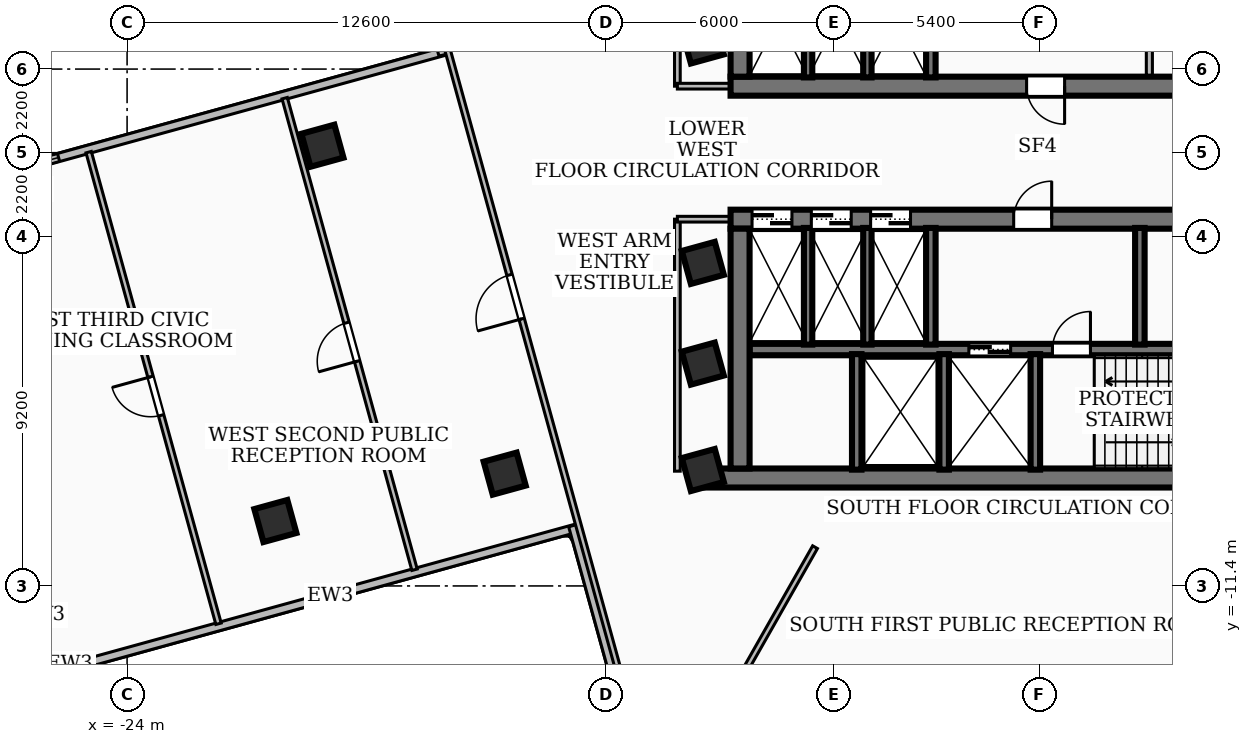
"""IFC4 building model, lengths in metres.
Left out: names, types, materials, properties, quantities, classifications, styles, units other than length and angle.
Written with IfcOpenShell. Run it as: python <this file> out.ifc"""

import sys

from ifc_helpers import new_model, si_unit, direction, frame, frame_2d, origin, origin_2d, place, context, subcontext, project, spatial, rectangle, extrude, element, fill, save


model = new_model("IFC4")
c1 = context("Model", 3, precision=1e-05, world=origin(), true_north=direction((0.0, 1.0)))
c2 = subcontext(c1, "Body", "Model", "MODEL_VIEW")
j1 = project(units=[si_unit("LENGTHUNIT", "METRE"), si_unit("PLANEANGLEUNIT", "RADIAN")], contexts=[c1])
p1 = place(None, origin())
s1 = spatial("IfcSite", under=j1, at=p1, CompositionType="ELEMENT")
p2 = place(p1, origin())
s2 = spatial("IfcBuilding", under=s1, at=p2, CompositionType="ELEMENT")
p3 = place(p2, frame((0.0, 0.0, 137.88)))
s3 = spatial("IfcBuildingStorey", under=s2, at=p3, CompositionType="ELEMENT", Elevation=137.88)
p4 = place(p3, frame((8.12, 1.75, 0.0), z_axis=(0.0, 0.0, 1.0), x_axis=(-1.0, 0.0, 0.0)))
e1 = element("IfcWall", 1, at=p4, inside=s3, PredefinedType="SHEAR", context=c2, shape_type="SweptSolid", body=[
    extrude(rectangle(XDim=16.24, YDim=0.5, at=frame_2d((8.12, 0.0))), origin(), (0.0, 0.0, 1.0), 3.32),
])
p5 = place(p4, frame((7.45, 0.0, 0.0)))
e2 = element("IfcOpeningElement", 2, at=p5, cuts=e1, PredefinedType="OPENING", context=c2, shape_type="SweptSolid", body=[
    extrude(rectangle(XDim=1.0, YDim=2.1, at=frame_2d((0.5, 1.05))), frame((0.0, 0.26, 0.0), z_axis=(0.0, -1.0, 0.0), x_axis=(1.0, 0.0, 0.0)), (0.0, 0.0, 1.0), 0.52),
])
p6 = place(p4, frame((3.4, 0.0, 0.0)))
e3 = element("IfcOpeningElement", 3, at=p6, cuts=e1, PredefinedType="OPENING", context=c2, shape_type="SweptSolid", body=[
    extrude(rectangle(XDim=0.9, YDim=2.06, at=frame_2d((0.45, 1.03))), frame((0.0, 0.26, 0.0), z_axis=(0.0, -1.0, 0.0), x_axis=(1.0, 0.0, 0.0)), (0.0, 0.0, 1.0), 0.52),
])
p7 = place(p4, frame((1.1, 0.0, 0.0)))
e4 = element("IfcOpeningElement", 4, at=p7, cuts=e1, PredefinedType="OPENING", context=c2, shape_type="SweptSolid", body=[
    extrude(rectangle(XDim=0.9, YDim=2.06, at=frame_2d((0.45, 1.03))), frame((0.0, 0.26, 0.0), z_axis=(0.0, -1.0, 0.0), x_axis=(1.0, 0.0, 0.0)), (0.0, 0.0, 1.0), 0.52),
])
p8 = place(p3, frame((-7.87, 2.0, 0.0), z_axis=(0.0, 0.0, 1.0), x_axis=(0.0, 1.0, 0.0)))
e5 = element("IfcWall", 5, at=p8, inside=s3, PredefinedType="SHEAR", context=c2, shape_type="SweptSolid", body=[
    extrude(rectangle(XDim=6.31, YDim=0.5, at=frame_2d((3.155, 0.0))), origin(), (0.0, 0.0, 1.0), 3.32),
])
p9 = place(p3, frame((8.78, -8.56, 0.0), z_axis=(0.0, 0.0, 1.0), x_axis=(-1.0, 0.0, 0.0)))
e6 = element("IfcWall", 6, at=p9, inside=s3, PredefinedType="SHEAR", context=c2, shape_type="SweptSolid", body=[
    extrude(rectangle(XDim=17.56, YDim=0.5, at=frame_2d((8.78, 0.0))), origin(), (0.0, 0.0, 1.0), 3.32),
])
p10 = place(p3, frame((-8.12, -1.75, 0.0), z_axis=(0.0, 0.0, 1.0), x_axis=(1.0, 0.0, 0.0)))
e7 = element("IfcWall", 7, at=p10, inside=s3, PredefinedType="SHEAR", context=c2, shape_type="SweptSolid", body=[
    extrude(rectangle(XDim=16.24, YDim=0.5, at=frame_2d((8.12, 0.0))), origin(), (0.0, 0.0, 1.0), 3.32),
])
p11 = place(p10, frame((7.45, 0.0, 0.0)))
e8 = element("IfcOpeningElement", 8, at=p11, cuts=e7, PredefinedType="OPENING", context=c2, shape_type="SweptSolid", body=[
    extrude(rectangle(XDim=1.0, YDim=2.1, at=frame_2d((0.5, 1.05))), frame((0.0, 0.26, 0.0), z_axis=(0.0, -1.0, 0.0), x_axis=(1.0, 0.0, 0.0)), (0.0, 0.0, 1.0), 0.52),
])
p12 = place(p10, frame((12.65, 0.0, 0.0)))
e9 = element("IfcOpeningElement", 9, at=p12, cuts=e7, PredefinedType="OPENING", context=c2, shape_type="SweptSolid", body=[
    extrude(rectangle(XDim=0.9, YDim=2.06, at=frame_2d((0.45, 1.03))), frame((0.0, 0.26, 0.0), z_axis=(0.0, -1.0, 0.0), x_axis=(1.0, 0.0, 0.0)), (0.0, 0.0, 1.0), 0.52),
])
p13 = place(p10, frame((0.565, 0.0, 0.0)))
e10 = element("IfcOpeningElement", 10, at=p13, cuts=e7, PredefinedType="OPENING", context=c2, shape_type="SweptSolid", body=[
    extrude(rectangle(XDim=1.05, YDim=2.15, at=frame_2d((0.525, 1.075))), frame((0.0, 0.26, 0.0), z_axis=(0.0, -1.0, 0.0), x_axis=(1.0, 0.0, 0.0)), (0.0, 0.0, 1.0), 0.52),
])
p14 = place(p10, frame((2.125, 0.0, 0.0)))
e11 = element("IfcOpeningElement", 11, at=p14, cuts=e7, PredefinedType="OPENING", context=c2, shape_type="SweptSolid", body=[
    extrude(rectangle(XDim=1.05, YDim=2.15, at=frame_2d((0.525, 1.075))), frame((0.0, 0.26, 0.0), z_axis=(0.0, -1.0, 0.0), x_axis=(1.0, 0.0, 0.0)), (0.0, 0.0, 1.0), 0.52),
])
p15 = place(p10, frame((3.685, 0.0, 0.0)))
e12 = element("IfcOpeningElement", 12, at=p15, cuts=e7, PredefinedType="OPENING", context=c2, shape_type="SweptSolid", body=[
    extrude(rectangle(XDim=1.05, YDim=2.15, at=frame_2d((0.525, 1.075))), frame((0.0, 0.26, 0.0), z_axis=(0.0, -1.0, 0.0), x_axis=(1.0, 0.0, 0.0)), (0.0, 0.0, 1.0), 0.52),
])
p16 = place(p3, frame((-7.87, -8.31, 0.0), z_axis=(0.0, 0.0, 1.0), x_axis=(0.0, 1.0, 0.0)))
e13 = element("IfcWall", 13, at=p16, inside=s3, PredefinedType="SHEAR", context=c2, shape_type="SweptSolid", body=[
    extrude(rectangle(XDim=6.31, YDim=0.5, at=frame_2d((3.155, 0.0))), origin(), (0.0, 0.0, 1.0), 3.32),
])
p17 = place(p3, frame((-7.62, -5.18, 0.0), z_axis=(0.0, 0.0, 1.0), x_axis=(1.0, 0.0, 0.0)))
e14 = element("IfcWall", 14, at=p17, inside=s3, PredefinedType="SOLIDWALL", context=c2, shape_type="SweptSolid", body=[
    extrude(rectangle(XDim=15.24, YDim=0.3, at=frame_2d((7.62, 0.0))), origin(), (0.0, 0.0, 1.0), 3.32),
])
p18 = place(p17, frame((5.77, 0.0, 0.0)))
e15 = element("IfcOpeningElement", 15, at=p18, cuts=e14, PredefinedType="OPENING", context=c2, shape_type="SweptSolid", body=[
    extrude(rectangle(XDim=1.1, YDim=2.15, at=frame_2d((0.55, 1.075))), frame((0.0, 0.16, 0.0), z_axis=(0.0, -1.0, 0.0), x_axis=(1.0, 0.0, 0.0)), (0.0, 0.0, 1.0), 0.32),
])
p19 = place(p17, frame((7.97, 0.0, 0.0)))
e16 = element("IfcOpeningElement", 16, at=p19, cuts=e14, PredefinedType="OPENING", context=c2, shape_type="SweptSolid", body=[
    extrude(rectangle(XDim=1.0, YDim=2.1, at=frame_2d((0.5, 1.05))), frame((0.0, 0.16, 0.0), z_axis=(0.0, -1.0, 0.0), x_axis=(1.0, 0.0, 0.0)), (0.0, 0.0, 1.0), 0.32),
])
p20 = place(p3, frame((-2.85, 1.98, 0.0), z_axis=(0.0, 0.0, 1.0), x_axis=(0.0, 1.0, 0.0)))
e17 = element("IfcWall", 17, at=p20, inside=s3, PredefinedType="SOLIDWALL", context=c2, shape_type="SweptSolid", body=[
    extrude(rectangle(XDim=3.07, YDim=0.25, at=frame_2d((1.535, 0.0))), origin(), (0.0, 0.0, 1.0), 3.32),
])
for number, where, z_axis, x_axis in (
    (18, (-0.1, -8.34, 0.0), (0.0, 0.0, 1.0), (0.0, 1.0, 0.0)),
    (19, (-2.5, -8.34, 0.0), (0.0, 0.0, 1.0), (0.0, 1.0, 0.0)),
    (20, (-4.8, -8.34, 0.0), (0.0, 0.0, 1.0), (0.0, 1.0, 0.0)),
):
    element("IfcWall", number, at=place(p3, frame(where, z_axis=z_axis, x_axis=x_axis)), inside=s3, PredefinedType="SOLIDWALL", context=c2, shape_type="SweptSolid", body=[
        extrude(rectangle(XDim=3.04, YDim=0.25, at=frame_2d((1.52, 0.0))), origin(), (0.0, 0.0, 1.0), 3.32),
    ])
for number, where, z_axis, x_axis in (
    (21, (-2.85, -5.05, 0.0), (0.0, 0.0, 1.0), (0.0, 1.0, 0.0)),
    (22, (2.65, -5.05, 0.0), (0.0, 0.0, 1.0), (0.0, 1.0, 0.0)),
):
    element("IfcWall", number, at=place(p3, frame(where, z_axis=z_axis, x_axis=x_axis)), inside=s3, PredefinedType="SOLIDWALL", context=c2, shape_type="SweptSolid", body=[
        extrude(rectangle(XDim=3.07, YDim=0.25, at=frame_2d((1.535, 0.0))), origin(), (0.0, 0.0, 1.0), 3.32),
    ])
for number, where, z_axis, x_axis in (
    (23, (-6.08, 1.98, 0.0), (0.0, 0.0, 1.0), (0.0, 1.0, 0.0)),
    (24, (-4.52, 1.98, 0.0), (0.0, 0.0, 1.0), (0.0, 1.0, 0.0)),
    (25, (-6.08, -5.05, 0.0), (0.0, 0.0, 1.0), (0.0, 1.0, 0.0)),
    (26, (-4.52, -5.05, 0.0), (0.0, 0.0, 1.0), (0.0, 1.0, 0.0)),
):
    element("IfcWall", number, at=place(p3, frame(where, z_axis=z_axis, x_axis=x_axis)), inside=s3, PredefinedType="SOLIDWALL", context=c2, shape_type="SweptSolid", body=[
        extrude(rectangle(XDim=3.07, YDim=0.22, at=frame_2d((1.535, 0.0))), origin(), (0.0, 0.0, 1.0), 3.32),
    ])
for number, where, z_axis, x_axis in (
    (27, (-8.85, -5.55, 0.0), (0.0, 0.0, 1.0), (0.964, 0.266, 0.0)),
    (28, (-8.85, -2.9, 0.0), (0.0, 0.0, 1.0), (0.964, 0.266, 0.0)),
    (29, (-8.85, 2.9, 0.0), (0.0, 0.0, 1.0), (0.964, 0.266, 0.0)),
    (30, (-8.85, -8.35, 0.0), (0.0, 0.0, 1.0), (0.964, 0.266, 0.0)),
    (31, (-18.86, 0.183, 0.0), (0.0, 0.0, 1.0), (0.964, 0.266, 0.0)),
    (32, (-14.064, -8.445, 0.0), (0.0, 0.0, 1.0), (0.964, 0.266, 0.0)),
    (33, (-20.098, -9.692, 0.0), (0.0, 0.0, 1.0), (0.964, 0.266, 0.0)),
):
    element("IfcColumn", number, at=place(p3, frame(where, z_axis=z_axis, x_axis=x_axis)), inside=s3, PredefinedType="COLUMN", context=c2, shape_type="SweptSolid", body=[
        extrude(rectangle(XDim=0.9, YDim=0.9, at=origin_2d()), origin(), (0.0, 0.0, 1.0), 3.6),
    ])
p21 = place(p3, frame((-12.166, -9.876, 0.0), z_axis=(0.0, 0.0, 1.0), x_axis=(-0.964099811745, -0.2655401156, 0.0)))
e34 = element("IfcWall", 34, at=p21, inside=s3, PredefinedType="SOLIDWALL", context=c2, shape_type="SweptSolid", body=[
    extrude(rectangle(XDim=13.459, YDim=0.22, at=frame_2d((6.729, 0.0))), origin(), (0.0, 0.0, 1.0), 2.624),
])
p22 = place(p3, frame((-25.093, -13.443, 0.0), z_axis=(0.0, 0.0, 1.0), x_axis=(-0.999982861094, -0.005854700592, 0.0)))
e35 = element("IfcWall", 35, at=p22, inside=s3, PredefinedType="SOLIDWALL", context=c2, shape_type="SweptSolid", body=[
    extrude(rectangle(XDim=0.834, YDim=0.22, at=frame_2d((0.417, 0.0))), origin(), (0.0, 0.0, 1.0), 3.32),
])
p23 = place(p3, frame((-25.88, -13.46, 0.0), z_axis=(0.0, 0.0, 1.0), x_axis=(-0.87005199541, 0.492959963164, 0.0)))
e36 = element("IfcWall", 36, at=p23, inside=s3, PredefinedType="SOLIDWALL", context=c2, shape_type="SweptSolid", body=[
    extrude(rectangle(XDim=0.82, YDim=0.22, at=frame_2d((0.41, 0.0))), origin(), (0.0, 0.0, 1.0), 3.32),
])
p24 = place(p3, frame((-28.599, -0.897, 0.0), z_axis=(0.0, 0.0, 1.0), x_axis=(0.964113270695, 0.265491245185, 0.0)))
e37 = element("IfcWall", 37, at=p24, inside=s3, PredefinedType="SOLIDWALL", context=c2, shape_type="SweptSolid", body=[
    extrude(rectangle(XDim=13.458, YDim=0.22, at=frame_2d((6.729, 0.0))), origin(), (0.0, 0.0, 1.0), 3.32),
])
p25 = place(p24, frame((1.1, 0.0, 0.85)))
e38 = element("IfcOpeningElement", 38, at=p25, cuts=e37, PredefinedType="OPENING", context=c2, shape_type="SweptSolid", body=[
    extrude(rectangle(XDim=1.8, YDim=2.0, at=frame_2d((0.9, 1.0))), frame((0.0, 0.12, 0.0), z_axis=(0.0, -1.0, 0.0), x_axis=(1.0, 0.0, 0.0)), (0.0, 0.0, 1.0), 0.24),
])
p26 = place(p3, frame((-15.686, 2.568, 0.0), z_axis=(0.0, 0.0, 1.0), x_axis=(-0.265558779784, 0.964094670911, 0.0)))
e39 = element("IfcWall", 39, at=p26, inside=s3, PredefinedType="SOLIDWALL", context=c2, shape_type="SweptSolid", body=[
    extrude(rectangle(XDim=6.319, YDim=0.22, at=frame_2d((3.159, 0.0))), origin(), (0.0, 0.0, 1.0), 3.32),
])
p27 = place(p3, frame((-10.479, -16.33, 0.0), z_axis=(0.0, 0.0, 1.0), x_axis=(-0.265567840793, 0.964092175021, 0.0)))
e40 = element("IfcWall", 40, at=p27, inside=s3, PredefinedType="SOLIDWALL", context=c2, shape_type="SweptSolid", body=[
    extrude(rectangle(XDim=6.759, YDim=0.22, at=frame_2d((3.379, 0.0))), origin(), (0.0, 0.0, 1.0), 2.624),
])
p28 = place(p3, frame((2.9, 2.04, 0.0), z_axis=(0.0, 0.0, 1.0), x_axis=(0.0, 1.0, 0.0)))
e41 = element("IfcWall", 41, at=p28, inside=s3, PredefinedType="PARTITIONING", context=c2, shape_type="SweptSolid", body=[
    extrude(rectangle(XDim=2.94, YDim=0.16, at=frame_2d((1.47, 0.0))), origin(), (0.0, 0.0, 1.0), 2.55),
])
p29 = place(p28, frame((1.82, 0.0, 0.0)))
e42 = element("IfcOpeningElement", 42, at=p29, cuts=e41, PredefinedType="OPENING", context=c2, shape_type="SweptSolid", body=[
    extrude(rectangle(XDim=0.9, YDim=2.06, at=frame_2d((0.45, 1.03))), frame((0.0, 0.09, 0.0), z_axis=(0.0, -1.0, 0.0), x_axis=(1.0, 0.0, 0.0)), (0.0, 0.0, 1.0), 0.18),
])
p30 = place(p3, frame((-9.52, 1.75, 0.0), z_axis=(0.0, 0.0, 1.0), x_axis=(0.0, 1.0, 0.0)))
e43 = element("IfcWall", 43, at=p30, inside=s3, PredefinedType="PARTITIONING", context=c2, shape_type="SweptSolid", body=[
    extrude(rectangle(XDim=6.63, YDim=0.15, at=frame_2d((3.315, 0.0))), origin(), (0.0, 0.0, 1.0), 2.55),
])
p31 = place(p3, frame((-7.85, 1.75, 0.0), z_axis=(0.0, 0.0, 1.0), x_axis=(-1.0, 0.0, 0.0)))
e44 = element("IfcWall", 44, at=p31, inside=s3, PredefinedType="PARTITIONING", context=c2, shape_type="SweptSolid", body=[
    extrude(rectangle(XDim=1.67, YDim=0.15, at=frame_2d((0.835, 0.0))), origin(), (0.0, 0.0, 1.0), 2.55),
])
p32 = place(p3, frame((-9.52, -8.38, 0.0), z_axis=(0.0, 0.0, 1.0), x_axis=(0.0, 1.0, 0.0)))
e45 = element("IfcWall", 45, at=p32, inside=s3, PredefinedType="PARTITIONING", context=c2, shape_type="SweptSolid", body=[
    extrude(rectangle(XDim=6.63, YDim=0.15, at=frame_2d((3.315, 0.0))), origin(), (0.0, 0.0, 1.0), 2.55),
])
p33 = place(p3, frame((-7.85, -1.75, 0.0), z_axis=(0.0, 0.0, 1.0), x_axis=(-1.0, 0.0, 0.0)))
e46 = element("IfcWall", 46, at=p33, inside=s3, PredefinedType="PARTITIONING", context=c2, shape_type="SweptSolid", body=[
    extrude(rectangle(XDim=1.67, YDim=0.15, at=frame_2d((0.835, 0.0))), origin(), (0.0, 0.0, 1.0), 2.55),
])
p34 = place(p3, frame((-5.897, -10.38, 0.0), z_axis=(0.0, 0.0, 1.0), x_axis=(-0.49389771586, -0.869520009125, 0.0)))
e47 = element("IfcWall", 47, at=p34, inside=s3, PredefinedType="PARTITIONING", context=c2, shape_type="SweptSolid", body=[
    extrude(rectangle(XDim=7.737, YDim=0.145, at=frame_2d((3.868, 0.0))), origin(), (0.0, 0.0, 1.0), 2.55),
])
p35 = place(p3, frame((-10.999, -13.879, 0.0), z_axis=(0.0, 0.0, 1.0), x_axis=(-0.26558288107, 0.964088031915, 0.0)))
e48 = element("IfcWall", 48, at=p35, inside=s3, PredefinedType="PARTITIONING", context=c2, shape_type="SweptSolid", body=[
    extrude(rectangle(XDim=20.479, YDim=0.145, at=frame_2d((10.24, 0.0))), origin(), (0.0, 0.0, 1.0), 2.55),
])
p36 = place(p35, frame((9.86, 0.0, 0.0)))
e49 = element("IfcOpeningElement", 49, at=p36, cuts=e48, PredefinedType="OPENING", context=c2, shape_type="SweptSolid", body=[
    extrude(rectangle(XDim=1.2, YDim=2.1, at=frame_2d((0.6, 1.05))), frame((0.0, 0.083, 0.0), z_axis=(0.0, -1.0, 0.0), x_axis=(1.0, 0.0, 0.0)), (0.0, 0.0, 1.0), 0.165),
])
p37 = place(p3, frame((-16.436, -10.974, 0.0), z_axis=(0.0, 0.0, 1.0), x_axis=(-0.265498602623, 0.964111244621, 0.0)))
e50 = element("IfcWall", 50, at=p37, inside=s3, PredefinedType="PARTITIONING", context=c2, shape_type="SweptSolid", body=[
    extrude(rectangle(XDim=12.87, YDim=0.145, at=frame_2d((6.435, 0.0))), origin(), (0.0, 0.0, 1.0), 2.55),
])
p38 = place(p37, frame((5.69, 0.0, 0.0)))
e51 = element("IfcOpeningElement", 51, at=p38, cuts=e50, PredefinedType="OPENING", context=c2, shape_type="SweptSolid", body=[
    extrude(rectangle(XDim=1.05, YDim=2.08, at=frame_2d((0.525, 1.04))), frame((0.0, 0.083, 0.0), z_axis=(0.0, -1.0, 0.0), x_axis=(1.0, 0.0, 0.0)), (0.0, 0.0, 1.0), 0.165),
])
p39 = place(p3, frame((-21.594, -12.395, 0.0), z_axis=(0.0, 0.0, 1.0), x_axis=(-0.265484036431, 0.964115255766, 0.0)))
e52 = element("IfcWall", 52, at=p39, inside=s3, PredefinedType="PARTITIONING", context=c2, shape_type="SweptSolid", body=[
    extrude(rectangle(XDim=12.871, YDim=0.145, at=frame_2d((6.436, 0.0))), origin(), (0.0, 0.0, 1.0), 2.55),
])
p40 = place(p39, frame((5.689, 0.0, 0.0)))
e53 = element("IfcOpeningElement", 53, at=p40, cuts=e52, PredefinedType="OPENING", context=c2, shape_type="SweptSolid", body=[
    extrude(rectangle(XDim=1.05, YDim=2.08, at=frame_2d((0.525, 1.04))), frame((0.0, 0.083, 0.0), z_axis=(0.0, -1.0, 0.0), x_axis=(1.0, 0.0, 0.0)), (0.0, 0.0, 1.0), 0.165),
])
p41 = place(p3, frame((13.879, -10.999, 0.0), z_axis=(0.0, 0.0, 1.0), x_axis=(-0.964088031915, -0.26558288107, 0.0)))
e54 = element("IfcWall", 54, at=p41, inside=s3, PredefinedType="PARTITIONING", context=c2, shape_type="SweptSolid", body=[
    extrude(rectangle(XDim=20.479, YDim=0.145, at=frame_2d((10.24, 0.0))), origin(), (0.0, 0.0, 1.0), 2.55),
])
p42 = place(p41, frame((9.86, 0.0, 0.0)))
e55 = element("IfcOpeningElement", 55, at=p42, cuts=e54, PredefinedType="OPENING", context=c2, shape_type="SweptSolid", body=[
    extrude(rectangle(XDim=1.2, YDim=2.1, at=frame_2d((0.6, 1.05))), frame((0.0, 0.083, 0.0), z_axis=(0.0, -1.0, 0.0), x_axis=(1.0, 0.0, 0.0)), (0.0, 0.0, 1.0), 0.165),
])
p43 = place(p25, origin())
e56 = element("IfcWindow", 56, at=p43, inside=s3, PartitioningType="SINGLE_PANEL", PredefinedType="WINDOW", context=c2, shape_type="SweptSolid", body=[
    extrude(rectangle(XDim=1.8, YDim=2.0, at=frame_2d((0.9, 1.0))), frame((0.0, 0.03, 0.0), z_axis=(0.0, -1.0, 0.0), x_axis=(1.0, 0.0, 0.0)), (0.0, 0.0, 1.0), 0.06),
])
fill(e38, e56)
p44 = place(p5, origin())
e57 = element("IfcDoor", 57, at=p44, inside=s3, OperationType="SINGLE_SWING_LEFT", PredefinedType="DOOR", context=c2, shape_type="SweptSolid", body=[
    extrude(rectangle(XDim=1.0, YDim=2.1, at=frame_2d((0.5, 1.05))), frame((0.0, 0.025, 0.0), z_axis=(0.0, -1.0, 0.0), x_axis=(1.0, 0.0, 0.0)), (0.0, 0.0, 1.0), 0.05),
])
fill(e2, e57)
p45 = place(p11, origin())
e58 = element("IfcDoor", 58, at=p45, inside=s3, OperationType="SINGLE_SWING_RIGHT", PredefinedType="DOOR", context=c2, shape_type="SweptSolid", body=[
    extrude(rectangle(XDim=1.0, YDim=2.1, at=frame_2d((0.5, 1.05))), frame((0.0, 0.025, 0.0), z_axis=(0.0, -1.0, 0.0), x_axis=(1.0, 0.0, 0.0)), (0.0, 0.0, 1.0), 0.05),
])
fill(e8, e58)
p46 = place(p18, origin())
e59 = element("IfcDoor", 59, at=p46, inside=s3, OperationType="DOUBLE_DOOR_SLIDING", PredefinedType="DOOR", context=c2, shape_type="SweptSolid", body=[
    extrude(rectangle(XDim=1.1, YDim=2.15, at=frame_2d((0.55, 1.075))), frame((0.0, 0.025, 0.0), z_axis=(0.0, -1.0, 0.0), x_axis=(1.0, 0.0, 0.0)), (0.0, 0.0, 1.0), 0.05),
])
fill(e15, e59)
p47 = place(p19, origin())
e60 = element("IfcDoor", 60, at=p47, inside=s3, OperationType="SINGLE_SWING_RIGHT", PredefinedType="DOOR", context=c2, shape_type="SweptSolid", body=[
    extrude(rectangle(XDim=1.0, YDim=2.1, at=frame_2d((0.5, 1.05))), frame((0.0, 0.025, 0.0), z_axis=(0.0, -1.0, 0.0), x_axis=(1.0, 0.0, 0.0)), (0.0, 0.0, 1.0), 0.05),
])
fill(e16, e60)
p48 = place(p13, origin())
e61 = element("IfcDoor", 61, at=p48, inside=s3, OperationType="DOUBLE_DOOR_SLIDING", PredefinedType="DOOR", context=c2, shape_type="SweptSolid", body=[
    extrude(rectangle(XDim=1.05, YDim=2.15, at=frame_2d((0.525, 1.075))), frame((0.0, 0.025, 0.0), z_axis=(0.0, -1.0, 0.0), x_axis=(1.0, 0.0, 0.0)), (0.0, 0.0, 1.0), 0.05),
])
fill(e10, e61)
p49 = place(p14, origin())
e62 = element("IfcDoor", 62, at=p49, inside=s3, OperationType="DOUBLE_DOOR_SLIDING", PredefinedType="DOOR", context=c2, shape_type="SweptSolid", body=[
    extrude(rectangle(XDim=1.05, YDim=2.15, at=frame_2d((0.525, 1.075))), frame((0.0, 0.025, 0.0), z_axis=(0.0, -1.0, 0.0), x_axis=(1.0, 0.0, 0.0)), (0.0, 0.0, 1.0), 0.05),
])
fill(e11, e62)
p50 = place(p15, origin())
e63 = element("IfcDoor", 63, at=p50, inside=s3, OperationType="DOUBLE_DOOR_SLIDING", PredefinedType="DOOR", context=c2, shape_type="SweptSolid", body=[
    extrude(rectangle(XDim=1.05, YDim=2.15, at=frame_2d((0.525, 1.075))), frame((0.0, 0.025, 0.0), z_axis=(0.0, -1.0, 0.0), x_axis=(1.0, 0.0, 0.0)), (0.0, 0.0, 1.0), 0.05),
])
fill(e12, e63)
p51 = place(p36, origin())
e64 = element("IfcDoor", 64, at=p51, inside=s3, OperationType="SINGLE_SWING_LEFT", PredefinedType="DOOR", context=c2, shape_type="SweptSolid", body=[
    extrude(rectangle(XDim=1.2, YDim=2.1, at=frame_2d((0.6, 1.05))), frame((0.0, 0.025, 0.0), z_axis=(0.0, -1.0, 0.0), x_axis=(1.0, 0.0, 0.0)), (0.0, 0.0, 1.0), 0.05),
])
fill(e49, e64)
p52 = place(p38, origin())
e65 = element("IfcDoor", 65, at=p52, inside=s3, OperationType="SINGLE_SWING_LEFT", PredefinedType="DOOR", context=c2, shape_type="SweptSolid", body=[
    extrude(rectangle(XDim=1.05, YDim=2.08, at=frame_2d((0.525, 1.04))), frame((0.0, 0.025, 0.0), z_axis=(0.0, -1.0, 0.0), x_axis=(1.0, 0.0, 0.0)), (0.0, 0.0, 1.0), 0.05),
])
fill(e51, e65)
p53 = place(p40, origin())
e66 = element("IfcDoor", 66, at=p53, inside=s3, OperationType="SINGLE_SWING_RIGHT", PredefinedType="DOOR", context=c2, shape_type="SweptSolid", body=[
    extrude(rectangle(XDim=1.05, YDim=2.08, at=frame_2d((0.525, 1.04))), frame((0.0, 0.025, 0.0), z_axis=(0.0, -1.0, 0.0), x_axis=(1.0, 0.0, 0.0)), (0.0, 0.0, 1.0), 0.05),
])
fill(e53, e66)
save(model, sys.argv[1])
